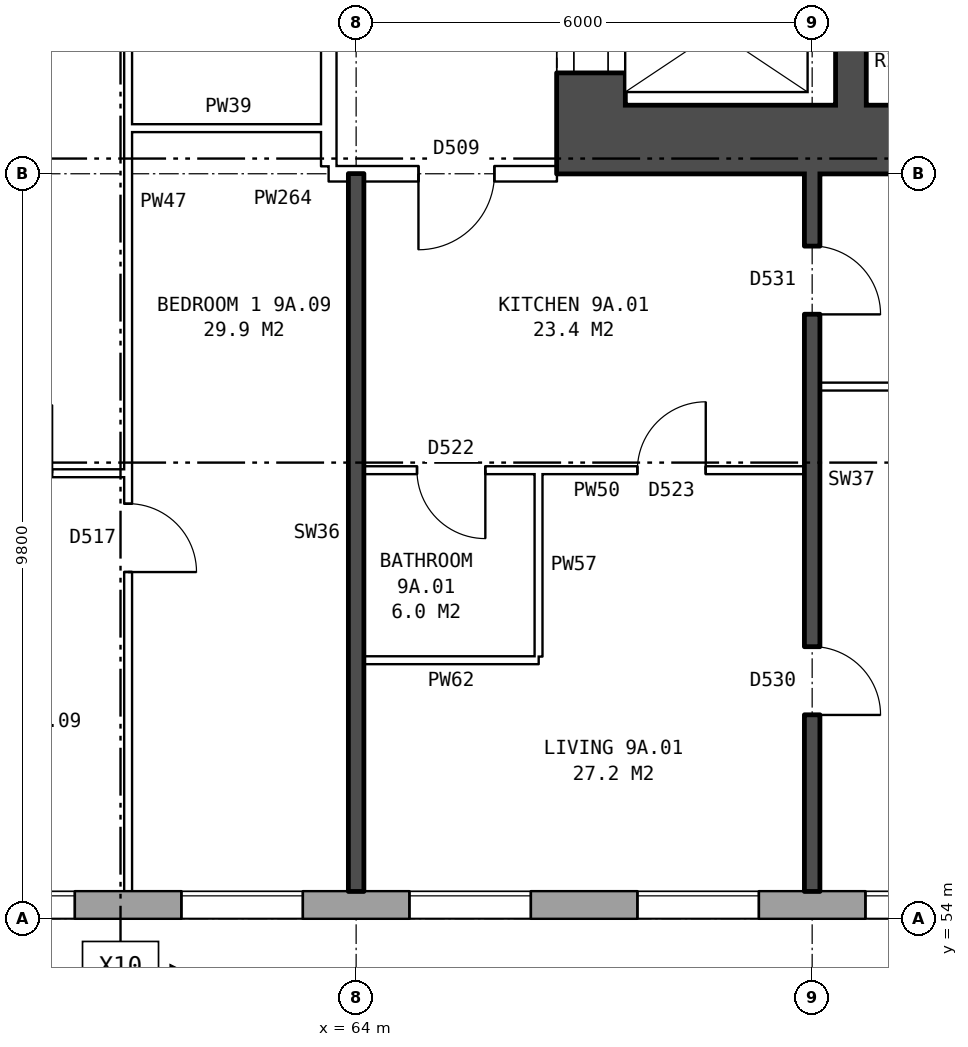
"""IFC4 building model, lengths in metres.
Left out: names, types, materials, properties, quantities, classifications, styles, units other than length and angle.
Written with IfcOpenShell. Run it as: python <this file> out.ifc"""

import sys

from ifc_helpers import new_model, si_unit, direction, frame, frame_2d, origin, place, context, subcontext, project, spatial, rectangle, extrude, element, fill, save


model = new_model("IFC4")
c1 = context("Model", 3, precision=1e-05, world=origin(), true_north=direction((0.0, 1.0)))
c2 = subcontext(c1, "Body", "Model", "MODEL_VIEW")
j1 = project(units=[si_unit("LENGTHUNIT", "METRE"), si_unit("PLANEANGLEUNIT", "RADIAN")], contexts=[c1])
p1 = place(None, origin())
s1 = spatial("IfcSite", under=j1, at=p1, CompositionType="ELEMENT")
p2 = place(p1, origin())
s2 = spatial("IfcBuilding", under=s1, at=p2, CompositionType="ELEMENT")
p3 = place(p2, frame((0.0, 0.0, 35.0)))
s3 = spatial("IfcBuildingStorey", under=s2, at=p3, CompositionType="ELEMENT", Elevation=35.0)
p4 = place(p3, frame((22.825, 54.18, 0.0), z_axis=(0.0, 0.0, 1.0), x_axis=(1.0, 0.0, 0.0)))
e1 = element("IfcWall", 1, at=p4, inside=s3, PredefinedType="STANDARD", context=c2, shape_type="SweptSolid", body=[
    extrude(rectangle(XDim=50.101, YDim=0.36, at=frame_2d((25.05, 0.0))), origin(), (0.0, 0.0, 1.0), 2.85),
])
p5 = place(p4, frame((2.875, 0.0, 0.8)))
e2 = element("IfcOpeningElement", 2, at=p5, cuts=e1, PredefinedType="OPENING", context=c2, shape_type="SweptSolid", body=[
    extrude(rectangle(XDim=1.6, YDim=1.8, at=frame_2d((0.8, 0.9))), frame((0.0, 0.19, 0.0), z_axis=(0.0, -1.0, 0.0), x_axis=(1.0, 0.0, 0.0)), (0.0, 0.0, 1.0), 0.38),
])
p6 = place(p4, frame((5.875, 0.0, 0.8)))
e3 = element("IfcOpeningElement", 3, at=p6, cuts=e1, PredefinedType="OPENING", context=c2, shape_type="SweptSolid", body=[
    extrude(rectangle(XDim=1.6, YDim=1.8, at=frame_2d((0.8, 0.9))), frame((0.0, 0.19, 0.0), z_axis=(0.0, -1.0, 0.0), x_axis=(1.0, 0.0, 0.0)), (0.0, 0.0, 1.0), 0.38),
])
p7 = place(p4, frame((8.875, 0.0, 0.8)))
e4 = element("IfcOpeningElement", 4, at=p7, cuts=e1, PredefinedType="OPENING", context=c2, shape_type="SweptSolid", body=[
    extrude(rectangle(XDim=1.6, YDim=1.8, at=frame_2d((0.8, 0.9))), frame((0.0, 0.19, 0.0), z_axis=(0.0, -1.0, 0.0), x_axis=(1.0, 0.0, 0.0)), (0.0, 0.0, 1.0), 0.38),
])
p8 = place(p4, frame((11.875, 0.0, 0.8)))
e5 = element("IfcOpeningElement", 5, at=p8, cuts=e1, PredefinedType="OPENING", context=c2, shape_type="SweptSolid", body=[
    extrude(rectangle(XDim=1.6, YDim=1.8, at=frame_2d((0.8, 0.9))), frame((0.0, 0.19, 0.0), z_axis=(0.0, -1.0, 0.0), x_axis=(1.0, 0.0, 0.0)), (0.0, 0.0, 1.0), 0.38),
])
p9 = place(p4, frame((14.875, 0.0, 0.8)))
e6 = element("IfcOpeningElement", 6, at=p9, cuts=e1, PredefinedType="OPENING", context=c2, shape_type="SweptSolid", body=[
    extrude(rectangle(XDim=1.6, YDim=1.8, at=frame_2d((0.8, 0.9))), frame((0.0, 0.19, 0.0), z_axis=(0.0, -1.0, 0.0), x_axis=(1.0, 0.0, 0.0)), (0.0, 0.0, 1.0), 0.38),
])
p10 = place(p4, frame((17.875, 0.0, 0.8)))
e7 = element("IfcOpeningElement", 7, at=p10, cuts=e1, PredefinedType="OPENING", context=c2, shape_type="SweptSolid", body=[
    extrude(rectangle(XDim=1.6, YDim=1.8, at=frame_2d((0.8, 0.9))), frame((0.0, 0.19, 0.0), z_axis=(0.0, -1.0, 0.0), x_axis=(1.0, 0.0, 0.0)), (0.0, 0.0, 1.0), 0.38),
])
p11 = place(p4, frame((19.775, 0.0, 0.8)))
e8 = element("IfcOpeningElement", 8, at=p11, cuts=e1, PredefinedType="OPENING", context=c2, shape_type="SweptSolid", body=[
    extrude(rectangle(XDim=1.6, YDim=1.8, at=frame_2d((0.8, 0.9))), frame((0.0, 0.19, 0.0), z_axis=(0.0, -1.0, 0.0), x_axis=(1.0, 0.0, 0.0)), (0.0, 0.0, 1.0), 0.38),
])
p12 = place(p4, frame((23.375, 0.0, 0.15)))
e9 = element("IfcOpeningElement", 9, at=p12, cuts=e1, PredefinedType="OPENING", context=c2, shape_type="SweptSolid", body=[
    extrude(rectangle(XDim=0.6, YDim=0.9, at=frame_2d((0.3, 0.45))), frame((0.0, 0.19, 0.0), z_axis=(0.0, -1.0, 0.0), x_axis=(1.0, 0.0, 0.0)), (0.0, 0.0, 1.0), 0.38),
])
p13 = place(p4, frame((27.275, 0.0, 1.7)))
e10 = element("IfcOpeningElement", 10, at=p13, cuts=e1, PredefinedType="OPENING", context=c2, shape_type="SweptSolid", body=[
    extrude(rectangle(XDim=0.6, YDim=0.9, at=frame_2d((0.3, 0.45))), frame((0.0, 0.19, 0.0), z_axis=(0.0, -1.0, 0.0), x_axis=(1.0, 0.0, 0.0)), (0.0, 0.0, 1.0), 0.38),
])
p14 = place(p4, frame((29.875, 0.0, 0.8)))
e11 = element("IfcOpeningElement", 11, at=p14, cuts=e1, PredefinedType="OPENING", context=c2, shape_type="SweptSolid", body=[
    extrude(rectangle(XDim=1.6, YDim=1.8, at=frame_2d((0.8, 0.9))), frame((0.0, 0.19, 0.0), z_axis=(0.0, -1.0, 0.0), x_axis=(1.0, 0.0, 0.0)), (0.0, 0.0, 1.0), 0.38),
])
p15 = place(p4, frame((32.875, 0.0, 0.8)))
e12 = element("IfcOpeningElement", 12, at=p15, cuts=e1, PredefinedType="OPENING", context=c2, shape_type="SweptSolid", body=[
    extrude(rectangle(XDim=1.6, YDim=1.8, at=frame_2d((0.8, 0.9))), frame((0.0, 0.19, 0.0), z_axis=(0.0, -1.0, 0.0), x_axis=(1.0, 0.0, 0.0)), (0.0, 0.0, 1.0), 0.38),
])
p16 = place(p4, frame((35.875, 0.0, 0.8)))
e13 = element("IfcOpeningElement", 13, at=p16, cuts=e1, PredefinedType="OPENING", context=c2, shape_type="SweptSolid", body=[
    extrude(rectangle(XDim=1.6, YDim=1.8, at=frame_2d((0.8, 0.9))), frame((0.0, 0.19, 0.0), z_axis=(0.0, -1.0, 0.0), x_axis=(1.0, 0.0, 0.0)), (0.0, 0.0, 1.0), 0.38),
])
p17 = place(p4, frame((38.875, 0.0, 0.8)))
e14 = element("IfcOpeningElement", 14, at=p17, cuts=e1, PredefinedType="OPENING", context=c2, shape_type="SweptSolid", body=[
    extrude(rectangle(XDim=1.6, YDim=1.8, at=frame_2d((0.8, 0.9))), frame((0.0, 0.19, 0.0), z_axis=(0.0, -1.0, 0.0), x_axis=(1.0, 0.0, 0.0)), (0.0, 0.0, 1.0), 0.38),
])
p18 = place(p4, frame((41.875, 0.0, 0.8)))
e15 = element("IfcOpeningElement", 15, at=p18, cuts=e1, PredefinedType="OPENING", context=c2, shape_type="SweptSolid", body=[
    extrude(rectangle(XDim=1.6, YDim=1.8, at=frame_2d((0.8, 0.9))), frame((0.0, 0.19, 0.0), z_axis=(0.0, -1.0, 0.0), x_axis=(1.0, 0.0, 0.0)), (0.0, 0.0, 1.0), 0.38),
])
p19 = place(p4, frame((44.875, 0.0, 0.8)))
e16 = element("IfcOpeningElement", 16, at=p19, cuts=e1, PredefinedType="OPENING", context=c2, shape_type="SweptSolid", body=[
    extrude(rectangle(XDim=1.6, YDim=1.8, at=frame_2d((0.8, 0.9))), frame((0.0, 0.19, 0.0), z_axis=(0.0, -1.0, 0.0), x_axis=(1.0, 0.0, 0.0)), (0.0, 0.0, 1.0), 0.38),
])
p20 = place(p4, frame((47.875, 0.0, 0.8)))
e17 = element("IfcOpeningElement", 17, at=p20, cuts=e1, PredefinedType="OPENING", context=c2, shape_type="SweptSolid", body=[
    extrude(rectangle(XDim=1.6, YDim=1.8, at=frame_2d((0.8, 0.9))), frame((0.0, 0.19, 0.0), z_axis=(0.0, -1.0, 0.0), x_axis=(1.0, 0.0, 0.0)), (0.0, 0.0, 1.0), 0.38),
])
p21 = place(p4, frame((21.675, 0.0, 1.4)))
e18 = element("IfcOpeningElement", 18, at=p21, cuts=e1, PredefinedType="OPENING", context=c2, shape_type="SweptSolid", body=[
    extrude(rectangle(XDim=0.6, YDim=1.2, at=frame_2d((0.3, 0.6))), frame((0.0, 0.19, 0.0), z_axis=(0.0, -1.0, 0.0), x_axis=(1.0, 0.0, 0.0)), (0.0, 0.0, 1.0), 0.38),
])
p22 = place(p4, frame((24.275, 0.0, 0.15)))
e19 = element("IfcOpeningElement", 19, at=p22, cuts=e1, PredefinedType="OPENING", context=c2, shape_type="SweptSolid", body=[
    extrude(rectangle(XDim=1.6, YDim=1.5, at=frame_2d((0.8, 0.75))), frame((0.0, 0.19, 0.0), z_axis=(0.0, -1.0, 0.0), x_axis=(1.0, 0.0, 0.0)), (0.0, 0.0, 1.0), 0.38),
])
p23 = place(p4, frame((28.175, 0.0, 1.1)))
e20 = element("IfcOpeningElement", 20, at=p23, cuts=e1, PredefinedType="OPENING", context=c2, shape_type="SweptSolid", body=[
    extrude(rectangle(XDim=0.8, YDim=1.5, at=frame_2d((0.4, 0.75))), frame((0.0, 0.19, 0.0), z_axis=(0.0, -1.0, 0.0), x_axis=(1.0, 0.0, 0.0)), (0.0, 0.0, 1.0), 0.38),
])
p24 = place(p3, frame((67.09, 64.7, 0.0), z_axis=(0.0, 0.0, 1.0), x_axis=(0.0, 1.0, 0.0)))
e21 = element("IfcWall", 21, at=p24, inside=s3, PredefinedType="SHEAR", context=c2, shape_type="SweptSolid", body=[
    extrude(rectangle(XDim=10.6, YDim=0.9, at=frame_2d((5.3, 0.0))), origin(), (0.0, 0.0, 1.0), 2.85),
])
p25 = place(p24, frame((0.425, 0.0, 0.0)))
e22 = element("IfcOpeningElement", 22, at=p25, cuts=e21, PredefinedType="OPENING", context=c2, shape_type="SweptSolid", body=[
    extrude(rectangle(XDim=1.1, YDim=2.1, at=frame_2d((0.55, 1.05))), frame((0.0, 0.46, 0.0), z_axis=(0.0, -1.0, 0.0), x_axis=(1.0, 0.0, 0.0)), (0.0, 0.0, 1.0), 0.92),
])
p26 = place(p24, frame((9.0, 0.0, 0.0)))
e23 = element("IfcOpeningElement", 23, at=p26, cuts=e21, PredefinedType="OPENING", context=c2, shape_type="SweptSolid", body=[
    extrude(rectangle(XDim=1.1, YDim=2.1, at=frame_2d((0.55, 1.05))), frame((0.0, 0.46, 0.0), z_axis=(0.0, -1.0, 0.0), x_axis=(1.0, 0.0, 0.0)), (0.0, 0.0, 1.0), 0.92),
])
p27 = place(p3, frame((66.64, 64.25, 0.0), z_axis=(0.0, 0.0, 1.0), x_axis=(1.0, 0.0, 0.0)))
e24 = element("IfcWall", 24, at=p27, inside=s3, PredefinedType="SHEAR", context=c2, shape_type="SweptSolid", body=[
    extrude(rectangle(XDim=9.0, YDim=0.9, at=frame_2d((4.5, 0.0))), origin(), (0.0, 0.0, 1.0), 2.85),
])
p28 = place(p3, frame((70.51, 64.7, 0.0), z_axis=(0.0, 0.0, 1.0), x_axis=(0.0, 1.0, 0.0)))
e25 = element("IfcWall", 25, at=p28, inside=s3, PredefinedType="SHEAR", context=c2, shape_type="SweptSolid", body=[
    extrude(rectangle(XDim=1.95, YDim=0.4, at=frame_2d((0.975, 0.0))), origin(), (0.0, 0.0, 1.0), 2.85),
])
p29 = place(p3, frame((63.64, 63.9, 0.0), z_axis=(0.0, 0.0, 1.0), x_axis=(0.0, 1.0, 0.0)))
e26 = element("IfcWall", 26, at=p29, inside=s3, PredefinedType="PARTITIONING", context=c2, shape_type="SweptSolid", body=[
    extrude(rectangle(XDim=12.2, YDim=0.2, at=frame_2d((6.1, 0.0))), origin(), (0.0, 0.0, 1.0), 2.85),
])
p30 = place(p29, frame((5.1, 0.0, 0.0)))
e27 = element("IfcOpeningElement", 27, at=p30, cuts=e26, PredefinedType="OPENING", context=c2, shape_type="SweptSolid", body=[
    extrude(rectangle(XDim=2.0, YDim=2.1, at=frame_2d((1.0, 1.05))), frame((0.0, 0.11, 0.0), z_axis=(0.0, -1.0, 0.0), x_axis=(1.0, 0.0, 0.0)), (0.0, 0.0, 1.0), 0.22),
])
p31 = place(p3, frame((64.1, 57.4, 0.0), z_axis=(0.0, 0.0, 1.0), x_axis=(1.0, 0.0, 0.0)))
e28 = element("IfcWall", 28, at=p31, inside=s3, PredefinedType="PARTITIONING", context=c2, shape_type="SweptSolid", body=[
    extrude(rectangle(XDim=2.3, YDim=0.1, at=frame_2d((1.15, 0.0))), origin(), (0.0, 0.0, 1.0), 2.85),
])
p32 = place(p3, frame((58.1, 59.86, 0.0), z_axis=(0.0, 0.0, 1.0), x_axis=(1.0, 0.0, 0.0)))
e29 = element("IfcWall", 29, at=p32, inside=s3, PredefinedType="PARTITIONING", context=c2, shape_type="SweptSolid", body=[
    extrude(rectangle(XDim=2.9, YDim=0.1, at=frame_2d((1.45, 0.0))), origin(), (0.0, 0.0, 1.0), 2.85),
])
p33 = place(p32, frame((1.0, 0.0, 0.0)))
e30 = element("IfcOpeningElement", 30, at=p33, cuts=e29, PredefinedType="OPENING", context=c2, shape_type="SweptSolid", body=[
    extrude(rectangle(XDim=0.9, YDim=2.1, at=frame_2d((0.45, 1.05))), frame((0.0, 0.06, 0.0), z_axis=(0.0, -1.0, 0.0), x_axis=(1.0, 0.0, 0.0)), (0.0, 0.0, 1.0), 0.12),
])
p34 = place(p3, frame((64.1, 59.9, 0.0), z_axis=(0.0, 0.0, 1.0), x_axis=(1.0, 0.0, 0.0)))
e31 = element("IfcWall", 31, at=p34, inside=s3, PredefinedType="PARTITIONING", context=c2, shape_type="SweptSolid", body=[
    extrude(rectangle(XDim=5.8, YDim=0.1, at=frame_2d((2.9, 0.0))), origin(), (0.0, 0.0, 1.0), 2.85),
])
p35 = place(p34, frame((3.6, 0.0, 0.0)))
e32 = element("IfcOpeningElement", 32, at=p35, cuts=e31, PredefinedType="OPENING", context=c2, shape_type="SweptSolid", body=[
    extrude(rectangle(XDim=0.9, YDim=2.1, at=frame_2d((0.45, 1.05))), frame((0.0, 0.06, 0.0), z_axis=(0.0, -1.0, 0.0), x_axis=(1.0, 0.0, 0.0)), (0.0, 0.0, 1.0), 0.12),
])
p36 = place(p34, frame((0.7, 0.0, 0.0)))
e33 = element("IfcOpeningElement", 33, at=p36, cuts=e31, PredefinedType="OPENING", context=c2, shape_type="SweptSolid", body=[
    extrude(rectangle(XDim=0.9, YDim=2.1, at=frame_2d((0.45, 1.05))), frame((0.0, 0.06, 0.0), z_axis=(0.0, -1.0, 0.0), x_axis=(1.0, 0.0, 0.0)), (0.0, 0.0, 1.0), 0.12),
])
p37 = place(p3, frame((70.1, 61.0, 0.0), z_axis=(0.0, 0.0, 1.0), x_axis=(1.0, 0.0, 0.0)))
e34 = element("IfcWall", 34, at=p37, inside=s3, PredefinedType="PARTITIONING", context=c2, shape_type="SweptSolid", body=[
    extrude(rectangle(XDim=5.54, YDim=0.1, at=frame_2d((2.77, 0.0))), origin(), (0.0, 0.0, 1.0), 2.85),
])
p38 = place(p3, frame((63.64, 63.8, 0.0), z_axis=(0.0, 0.0, 1.0), x_axis=(1.0, 0.0, 0.0)))
e35 = element("IfcWall", 35, at=p38, inside=s3, PredefinedType="PARTITIONING", context=c2, shape_type="SweptSolid", body=[
    extrude(rectangle(XDim=3.0, YDim=0.2, at=frame_2d((1.5, 0.0))), origin(), (0.0, 0.0, 1.0), 2.85),
])
p39 = place(p38, frame((1.18, 0.0, 0.0)))
e36 = element("IfcOpeningElement", 36, at=p39, cuts=e35, PredefinedType="OPENING", context=c2, shape_type="SweptSolid", body=[
    extrude(rectangle(XDim=1.0, YDim=2.1, at=frame_2d((0.5, 1.05))), frame((0.0, 0.11, 0.0), z_axis=(0.0, -1.0, 0.0), x_axis=(1.0, 0.0, 0.0)), (0.0, 0.0, 1.0), 0.22),
])
p40 = place(p3, frame((61.0, 64.4, 0.0), z_axis=(0.0, 0.0, 1.0), x_axis=(1.0, 0.0, 0.0)))
e37 = element("IfcWall", 37, at=p40, inside=s3, PredefinedType="PARTITIONING", context=c2, shape_type="SweptSolid", body=[
    extrude(rectangle(XDim=2.64, YDim=0.1, at=frame_2d((1.32, 0.0))), origin(), (0.0, 0.0, 1.0), 2.85),
])
p41 = place(p3, frame((61.0, 54.36, 0.0), z_axis=(0.0, 0.0, 1.0), x_axis=(0.0, 1.0, 0.0)))
e38 = element("IfcWall", 38, at=p41, inside=s3, PredefinedType="PARTITIONING", context=c2, shape_type="SweptSolid", body=[
    extrude(rectangle(XDim=14.34, YDim=0.1, at=frame_2d((7.17, 0.0))), origin(), (0.0, 0.0, 1.0), 2.85),
])
p42 = place(p41, frame((4.2, 0.0, 0.0)))
e39 = element("IfcOpeningElement", 39, at=p42, cuts=e38, PredefinedType="OPENING", context=c2, shape_type="SweptSolid", body=[
    extrude(rectangle(XDim=0.9, YDim=2.1, at=frame_2d((0.45, 1.05))), frame((0.0, 0.06, 0.0), z_axis=(0.0, -1.0, 0.0), x_axis=(1.0, 0.0, 0.0)), (0.0, 0.0, 1.0), 0.12),
])
p43 = place(p41, frame((13.04, 0.0, 0.0)))
e40 = element("IfcOpeningElement", 40, at=p43, cuts=e38, PredefinedType="OPENING", context=c2, shape_type="SweptSolid", body=[
    extrude(rectangle(XDim=0.9, YDim=2.1, at=frame_2d((0.45, 1.05))), frame((0.0, 0.06, 0.0), z_axis=(0.0, -1.0, 0.0), x_axis=(1.0, 0.0, 0.0)), (0.0, 0.0, 1.0), 0.12),
])
p44 = place(p3, frame((64.0, 54.36, 0.0), z_axis=(0.0, 0.0, 1.0), x_axis=(0.0, 1.0, 0.0)))
e41 = element("IfcWall", 41, at=p44, inside=s3, PredefinedType="SOLIDWALL", context=c2, shape_type="SweptSolid", body=[
    extrude(rectangle(XDim=9.44, YDim=0.2, at=frame_2d((4.72, 0.0))), origin(), (0.0, 0.0, 1.0), 2.85),
])
p45 = place(p3, frame((66.4, 57.45, 0.0), z_axis=(0.0, 0.0, 1.0), x_axis=(0.0, 1.0, 0.0)))
e42 = element("IfcWall", 42, at=p45, inside=s3, PredefinedType="PARTITIONING", context=c2, shape_type="SweptSolid", body=[
    extrude(rectangle(XDim=2.4, YDim=0.1, at=frame_2d((1.2, 0.0))), origin(), (0.0, 0.0, 1.0), 2.85),
])
p46 = place(p3, frame((70.0, 54.36, 0.0), z_axis=(0.0, 0.0, 1.0), x_axis=(0.0, 1.0, 0.0)))
e43 = element("IfcWall", 43, at=p46, inside=s3, PredefinedType="SOLIDWALL", context=c2, shape_type="SweptSolid", body=[
    extrude(rectangle(XDim=9.44, YDim=0.2, at=frame_2d((4.72, 0.0))), origin(), (0.0, 0.0, 1.0), 2.85),
])
p47 = place(p46, frame((2.32, 0.0, 0.0)))
e44 = element("IfcOpeningElement", 44, at=p47, cuts=e43, PredefinedType="OPENING", context=c2, shape_type="SweptSolid", body=[
    extrude(rectangle(XDim=0.9, YDim=2.1, at=frame_2d((0.45, 1.05))), frame((0.0, 0.11, 0.0), z_axis=(0.0, -1.0, 0.0), x_axis=(1.0, 0.0, 0.0)), (0.0, 0.0, 1.0), 0.22),
])
p48 = place(p46, frame((7.59, 0.0, 0.0)))
e45 = element("IfcOpeningElement", 45, at=p48, cuts=e43, PredefinedType="OPENING", context=c2, shape_type="SweptSolid", body=[
    extrude(rectangle(XDim=0.9, YDim=2.1, at=frame_2d((0.45, 1.05))), frame((0.0, 0.11, 0.0), z_axis=(0.0, -1.0, 0.0), x_axis=(1.0, 0.0, 0.0)), (0.0, 0.0, 1.0), 0.22),
])
p49 = place(p16, origin())
e46 = element("IfcWindow", 46, at=p49, inside=s3, PartitioningType="SINGLE_PANEL", PredefinedType="WINDOW", context=c2, shape_type="SweptSolid", body=[
    extrude(rectangle(XDim=1.6, YDim=1.8, at=frame_2d((0.8, 0.9))), frame((0.0, 0.15, 0.0), z_axis=(0.0, -1.0, 0.0), x_axis=(1.0, 0.0, 0.0)), (0.0, 0.0, 1.0), 0.06),
])
fill(e13, e46)
p50 = place(p17, origin())
e47 = element("IfcWindow", 47, at=p50, inside=s3, PartitioningType="SINGLE_PANEL", PredefinedType="WINDOW", context=c2, shape_type="SweptSolid", body=[
    extrude(rectangle(XDim=1.6, YDim=1.8, at=frame_2d((0.8, 0.9))), frame((0.0, 0.15, 0.0), z_axis=(0.0, -1.0, 0.0), x_axis=(1.0, 0.0, 0.0)), (0.0, 0.0, 1.0), 0.06),
])
fill(e14, e47)
p51 = place(p18, origin())
e48 = element("IfcWindow", 48, at=p51, inside=s3, PartitioningType="SINGLE_PANEL", PredefinedType="WINDOW", context=c2, shape_type="SweptSolid", body=[
    extrude(rectangle(XDim=1.6, YDim=1.8, at=frame_2d((0.8, 0.9))), frame((0.0, 0.15, 0.0), z_axis=(0.0, -1.0, 0.0), x_axis=(1.0, 0.0, 0.0)), (0.0, 0.0, 1.0), 0.06),
])
fill(e15, e48)
p52 = place(p19, origin())
e49 = element("IfcWindow", 49, at=p52, inside=s3, PartitioningType="SINGLE_PANEL", PredefinedType="WINDOW", context=c2, shape_type="SweptSolid", body=[
    extrude(rectangle(XDim=1.6, YDim=1.8, at=frame_2d((0.8, 0.9))), frame((0.0, 0.15, 0.0), z_axis=(0.0, -1.0, 0.0), x_axis=(1.0, 0.0, 0.0)), (0.0, 0.0, 1.0), 0.06),
])
fill(e16, e49)
p53 = place(p20, origin())
e50 = element("IfcWindow", 50, at=p53, inside=s3, PartitioningType="SINGLE_PANEL", PredefinedType="WINDOW", context=c2, shape_type="SweptSolid", body=[
    extrude(rectangle(XDim=1.6, YDim=1.8, at=frame_2d((0.8, 0.9))), frame((0.0, 0.15, 0.0), z_axis=(0.0, -1.0, 0.0), x_axis=(1.0, 0.0, 0.0)), (0.0, 0.0, 1.0), 0.06),
])
fill(e17, e50)
p54 = place(p25, origin())
e51 = element("IfcDoor", 51, at=p54, inside=s3, OperationType="DOUBLE_DOOR_SLIDING", PredefinedType="DOOR", context=c2, shape_type="SweptSolid", body=[
    extrude(rectangle(XDim=1.1, YDim=2.1, at=frame_2d((0.55, 1.05))), frame((0.0, -0.385, 0.0), z_axis=(0.0, -1.0, 0.0), x_axis=(1.0, 0.0, 0.0)), (0.0, 0.0, 1.0), 0.05),
])
fill(e22, e51)
p55 = place(p47, frame((0.9, 0.0, 0.0), z_axis=(0.0, 0.0, 1.0), x_axis=(-1.0, 0.0, 0.0)))
e52 = element("IfcDoor", 52, at=p55, inside=s3, OperationType="SINGLE_SWING_RIGHT", PredefinedType="DOOR", context=c2, shape_type="SweptSolid", body=[
    extrude(rectangle(XDim=0.9, YDim=2.1, at=frame_2d((0.45, 1.05))), frame((0.0, 0.025, 0.0), z_axis=(0.0, -1.0, 0.0), x_axis=(1.0, 0.0, 0.0)), (0.0, 0.0, 1.0), 0.05),
])
fill(e44, e52)
p56 = place(p48, frame((0.9, 0.0, 0.0), z_axis=(0.0, 0.0, 1.0), x_axis=(-1.0, 0.0, 0.0)))
e53 = element("IfcDoor", 53, at=p56, inside=s3, OperationType="SINGLE_SWING_RIGHT", PredefinedType="DOOR", context=c2, shape_type="SweptSolid", body=[
    extrude(rectangle(XDim=0.9, YDim=2.1, at=frame_2d((0.45, 1.05))), frame((0.0, 0.025, 0.0), z_axis=(0.0, -1.0, 0.0), x_axis=(1.0, 0.0, 0.0)), (0.0, 0.0, 1.0), 0.05),
])
fill(e45, e53)
p57 = place(p39, frame((1.0, 0.0, 0.0), z_axis=(0.0, 0.0, 1.0), x_axis=(-1.0, 0.0, 0.0)))
e54 = element("IfcDoor", 54, at=p57, inside=s3, OperationType="SINGLE_SWING_RIGHT", PredefinedType="DOOR", context=c2, shape_type="SweptSolid", body=[
    extrude(rectangle(XDim=1.0, YDim=2.1, at=frame_2d((0.5, 1.05))), frame((0.0, 0.025, 0.0), z_axis=(0.0, -1.0, 0.0), x_axis=(1.0, 0.0, 0.0)), (0.0, 0.0, 1.0), 0.05),
])
fill(e36, e54)
p58 = place(p35, origin())
e55 = element("IfcDoor", 55, at=p58, inside=s3, OperationType="SINGLE_SWING_RIGHT", PredefinedType="DOOR", context=c2, shape_type="SweptSolid", body=[
    extrude(rectangle(XDim=0.9, YDim=2.1, at=frame_2d((0.45, 1.05))), frame((0.0, 0.025, 0.0), z_axis=(0.0, -1.0, 0.0), x_axis=(1.0, 0.0, 0.0)), (0.0, 0.0, 1.0), 0.05),
])
fill(e32, e55)
p59 = place(p36, frame((0.9, 0.0, 0.0), z_axis=(0.0, 0.0, 1.0), x_axis=(-1.0, 0.0, 0.0)))
e56 = element("IfcDoor", 56, at=p59, inside=s3, OperationType="SINGLE_SWING_LEFT", PredefinedType="DOOR", context=c2, shape_type="SweptSolid", body=[
    extrude(rectangle(XDim=0.9, YDim=2.1, at=frame_2d((0.45, 1.05))), frame((0.0, 0.025, 0.0), z_axis=(0.0, -1.0, 0.0), x_axis=(1.0, 0.0, 0.0)), (0.0, 0.0, 1.0), 0.05),
])
fill(e33, e56)
p60 = place(p42, frame((0.9, 0.0, 0.0), z_axis=(0.0, 0.0, 1.0), x_axis=(-1.0, 0.0, 0.0)))
e57 = element("IfcDoor", 57, at=p60, inside=s3, OperationType="SINGLE_SWING_RIGHT", PredefinedType="DOOR", context=c2, shape_type="SweptSolid", body=[
    extrude(rectangle(XDim=0.9, YDim=2.1, at=frame_2d((0.45, 1.05))), frame((0.0, 0.025, 0.0), z_axis=(0.0, -1.0, 0.0), x_axis=(1.0, 0.0, 0.0)), (0.0, 0.0, 1.0), 0.05),
])
fill(e39, e57)
save(model, sys.argv[1])
